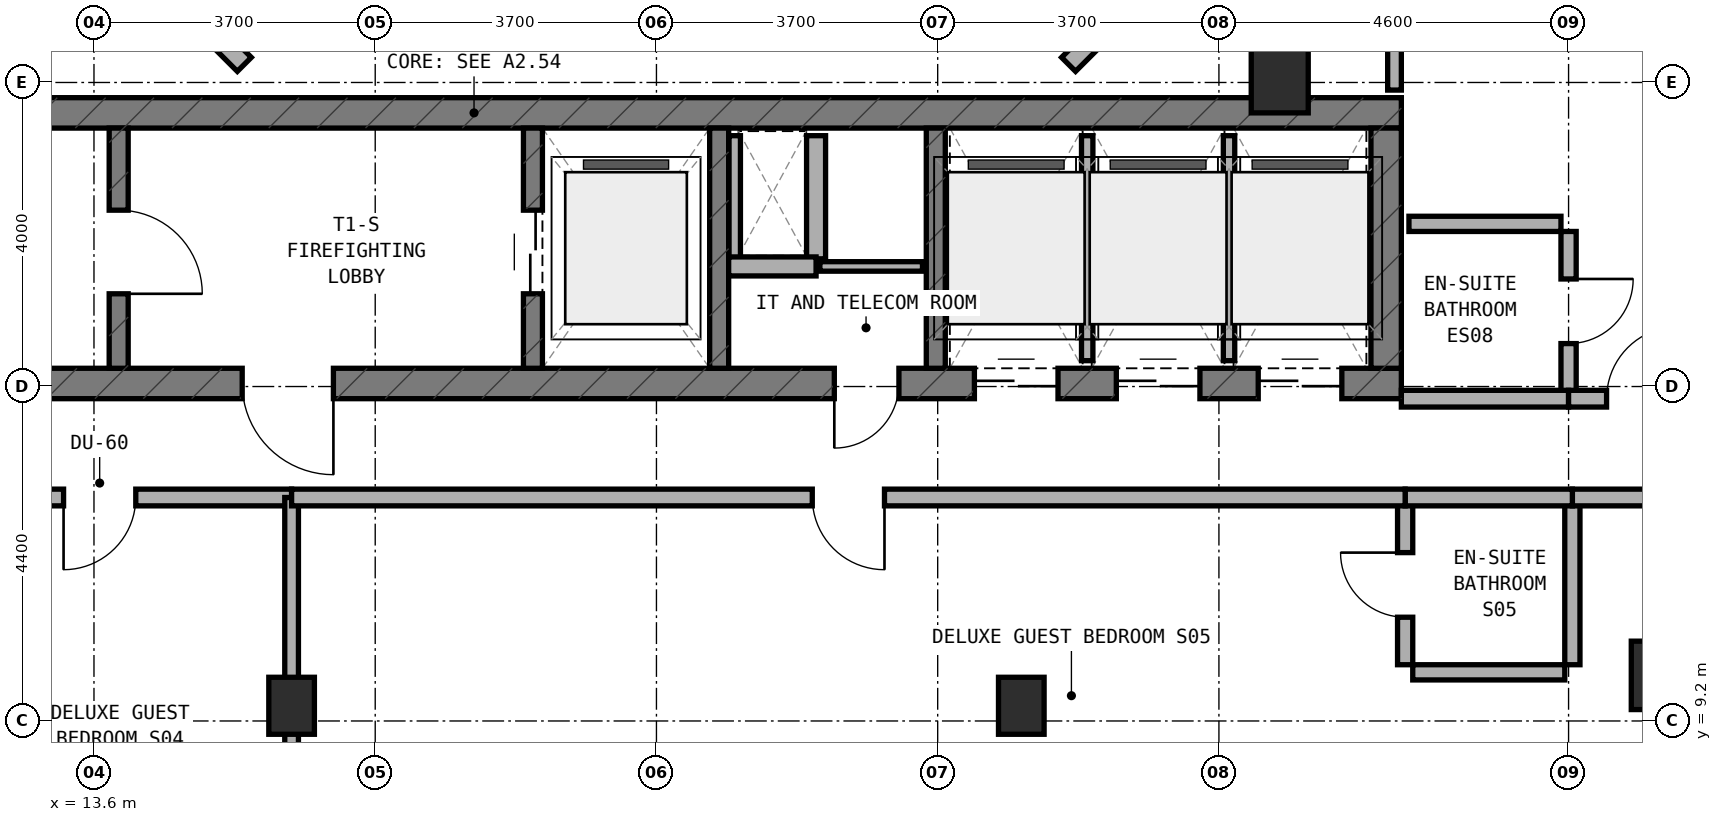
"""IFC4 building model, lengths in metres.
Left out: names, types, materials, properties, quantities, classifications, styles, units other than length and angle.
Written with IfcOpenShell. Run it as: python <this file> out.ifc"""

import sys

from ifc_helpers import new_model, si_unit, direction, frame, frame_2d, origin, origin_2d, place, context, subcontext, project, spatial, rectangle, extrude, element, fill, save


model = new_model("IFC4")
c1 = context("Model", 3, precision=1e-05, world=origin(), true_north=direction((0.0, 1.0)))
c2 = subcontext(c1, "Body", "Model", "MODEL_VIEW")
j1 = project(units=[si_unit("LENGTHUNIT", "METRE"), si_unit("PLANEANGLEUNIT", "RADIAN")], contexts=[c1])
p1 = place(None, origin())
s1 = spatial("IfcSite", under=j1, at=p1, CompositionType="ELEMENT")
p2 = place(p1, origin())
s2 = spatial("IfcBuilding", under=s1, at=p2, CompositionType="ELEMENT")
p3 = place(p2, frame((0.0, 0.0, 250.4)))
s3 = spatial("IfcBuildingStorey", under=s2, at=p3, CompositionType="ELEMENT", Elevation=250.4)
p4 = place(p3, frame((6.4, 13.64, 0.0), z_axis=(0.0, 0.0, 1.0), x_axis=(1.0, 0.0, 0.0)))
e1 = element("IfcWall", 1, at=p4, inside=s3, PredefinedType="SHEAR", context=c2, shape_type="SweptSolid", body=[
    extrude(rectangle(XDim=24.4, YDim=0.4, at=frame_2d((12.2, 0.0))), origin(), (0.0, 0.0, 1.0), 3.6),
])
p5 = place(p4, frame((9.15, 0.0, 0.0)))
e2 = element("IfcOpeningElement", 2, at=p5, cuts=e1, PredefinedType="OPENING", context=c2, shape_type="SweptSolid", body=[
    extrude(rectangle(XDim=1.2, YDim=2.15, at=frame_2d((0.6, 1.075))), frame((0.0, 0.21, 0.0), z_axis=(0.0, -1.0, 0.0), x_axis=(1.0, 0.0, 0.0)), (0.0, 0.0, 1.0), 0.42),
])
p6 = place(p4, frame((16.94, 0.0, 0.0)))
e3 = element("IfcOpeningElement", 3, at=p6, cuts=e1, PredefinedType="OPENING", context=c2, shape_type="SweptSolid", body=[
    extrude(rectangle(XDim=0.85, YDim=2.1, at=frame_2d((0.425, 1.05))), frame((0.0, 0.21, 0.0), z_axis=(0.0, -1.0, 0.0), x_axis=(1.0, 0.0, 0.0)), (0.0, 0.0, 1.0), 0.42),
])
p7 = place(p4, frame((18.783, 0.0, 0.0)))
e4 = element("IfcOpeningElement", 4, at=p7, cuts=e1, PredefinedType="OPENING", context=c2, shape_type="SweptSolid", body=[
    extrude(rectangle(XDim=1.1, YDim=2.15, at=frame_2d((0.55, 1.075))), frame((0.0, 0.21, 0.0), z_axis=(0.0, -1.0, 0.0), x_axis=(1.0, 0.0, 0.0)), (0.0, 0.0, 1.0), 0.42),
])
p8 = place(p4, frame((20.65, 0.0, 0.0)))
e5 = element("IfcOpeningElement", 5, at=p8, cuts=e1, PredefinedType="OPENING", context=c2, shape_type="SweptSolid", body=[
    extrude(rectangle(XDim=1.1, YDim=2.15, at=frame_2d((0.55, 1.075))), frame((0.0, 0.21, 0.0), z_axis=(0.0, -1.0, 0.0), x_axis=(1.0, 0.0, 0.0)), (0.0, 0.0, 1.0), 0.42),
])
p9 = place(p4, frame((22.517, 0.0, 0.0)))
e6 = element("IfcOpeningElement", 6, at=p9, cuts=e1, PredefinedType="OPENING", context=c2, shape_type="SweptSolid", body=[
    extrude(rectangle(XDim=1.1, YDim=2.15, at=frame_2d((0.55, 1.075))), frame((0.0, 0.21, 0.0), z_axis=(0.0, -1.0, 0.0), x_axis=(1.0, 0.0, 0.0)), (0.0, 0.0, 1.0), 0.42),
])
p10 = place(p3, frame((6.4, 17.2, 0.0), z_axis=(0.0, 0.0, 1.0), x_axis=(1.0, 0.0, 0.0)))
e7 = element("IfcWall", 7, at=p10, inside=s3, PredefinedType="SHEAR", context=c2, shape_type="SweptSolid", body=[
    extrude(rectangle(XDim=24.4, YDim=0.4, at=frame_2d((12.2, 0.0))), origin(), (0.0, 0.0, 1.0), 3.6),
])
p11 = place(p3, frame((30.6, 13.84, 0.0), z_axis=(0.0, 0.0, 1.0), x_axis=(0.0, 1.0, 0.0)))
e8 = element("IfcWall", 8, at=p11, inside=s3, PredefinedType="SHEAR", context=c2, shape_type="SweptSolid", body=[
    extrude(rectangle(XDim=3.16, YDim=0.4, at=frame_2d((1.58, 0.0))), origin(), (0.0, 0.0, 1.0), 3.6),
])
p12 = place(p3, frame((13.925, 13.84, 0.0), z_axis=(0.0, 0.0, 1.0), x_axis=(0.0, 1.0, 0.0)))
e9 = element("IfcWall", 9, at=p12, inside=s3, PredefinedType="STANDARD", context=c2, shape_type="SweptSolid", body=[
    extrude(rectangle(XDim=3.16, YDim=0.25, at=frame_2d((1.58, 0.0))), origin(), (0.0, 0.0, 1.0), 3.32),
])
p13 = place(p12, frame((0.98, 0.0, 0.0)))
e10 = element("IfcOpeningElement", 10, at=p13, cuts=e9, PredefinedType="OPENING", context=c2, shape_type="SweptSolid", body=[
    extrude(rectangle(XDim=1.1, YDim=2.15, at=frame_2d((0.55, 1.075))), frame((0.0, 0.135, 0.0), z_axis=(0.0, -1.0, 0.0), x_axis=(1.0, 0.0, 0.0)), (0.0, 0.0, 1.0), 0.27),
])
p14 = place(p3, frame((19.375, 13.84, 0.0), z_axis=(0.0, 0.0, 1.0), x_axis=(0.0, 1.0, 0.0)))
e11 = element("IfcWall", 11, at=p14, inside=s3, PredefinedType="STANDARD", context=c2, shape_type="SweptSolid", body=[
    extrude(rectangle(XDim=3.16, YDim=0.25, at=frame_2d((1.58, 0.0))), origin(), (0.0, 0.0, 1.0), 3.32),
])
p15 = place(p14, frame((0.98, 0.0, 0.0)))
e12 = element("IfcOpeningElement", 12, at=p15, cuts=e11, PredefinedType="OPENING", context=c2, shape_type="SweptSolid", body=[
    extrude(rectangle(XDim=1.1, YDim=2.15, at=frame_2d((0.55, 1.075))), frame((0.0, 0.135, 0.0), z_axis=(0.0, -1.0, 0.0), x_axis=(1.0, 0.0, 0.0)), (0.0, 0.0, 1.0), 0.27),
])
for number, where, z_axis, x_axis in (
    (13, (21.825, 13.84, 0.0), (0.0, 0.0, 1.0), (0.0, 1.0, 0.0)),
    (14, (24.675, 13.84, 0.0), (0.0, 0.0, 1.0), (0.0, 1.0, 0.0)),
):
    element("IfcWall", number, at=place(p3, frame(where, z_axis=z_axis, x_axis=x_axis)), inside=s3, PredefinedType="STANDARD", context=c2, shape_type="SweptSolid", body=[
        extrude(rectangle(XDim=3.16, YDim=0.25, at=frame_2d((1.58, 0.0))), origin(), (0.0, 0.0, 1.0), 3.32),
    ])
for number, where, z_axis, x_axis in (
    (15, (16.2, 9.4, 0.0), (0.0, 0.0, 1.0), (1.0, 0.0, 0.0)),
    (16, (25.8, 9.4, 0.0), (0.0, 0.0, 1.0), (1.0, 0.0, 0.0)),
):
    element("IfcColumn", number, at=place(p3, frame(where, z_axis=z_axis, x_axis=x_axis)), inside=s3, PredefinedType="COLUMN", context=c2, shape_type="SweptSolid", body=[
        extrude(rectangle(XDim=0.6, YDim=0.75, at=origin_2d()), origin(), (0.0, 0.0, 1.0), 3.6),
    ])
for number, where, z_axis, x_axis in (
    (17, (34.2, 9.8, 0.0), (0.0, 0.0, 1.0), (1.0, 0.0, 0.0)),
    (18, (29.2, 17.65, 0.0), (0.0, 0.0, 1.0), (1.0, 0.0, 0.0)),
):
    element("IfcColumn", number, at=place(p3, frame(where, z_axis=z_axis, x_axis=x_axis)), inside=s3, PredefinedType="COLUMN", context=c2, shape_type="SweptSolid", body=[
        extrude(rectangle(XDim=0.75, YDim=0.9, at=origin_2d()), origin(), (0.0, 0.0, 1.0), 3.6),
    ])
for number, where, z_axis, x_axis in (
    (19, (26.422, 17.838, 0.0), (0.0, 0.0, 1.0), (0.707, 0.707, 0.0)),
    (20, (13.944, 19.472, 0.0), (0.0, 0.0, 1.0), (0.707, -0.707, 0.0)),
):
    element("IfcWall", number, at=place(p3, frame(where, z_axis=z_axis, x_axis=x_axis)), inside=s3, PredefinedType="STANDARD", context=c2, shape_type="SweptSolid", body=[
        extrude(rectangle(XDim=2.311, YDim=0.26, at=frame_2d((1.155, 0.0))), origin(), (0.0, 0.0, 1.0), 3.32),
    ])
p16 = place(p3, frame((22.03, 15.28, 0.0), z_axis=(0.0, 0.0, 1.0), x_axis=(0.0, 1.0, 0.0)))
e21 = element("IfcWall", 21, at=p16, inside=s3, PredefinedType="PARTITIONING", context=c2, shape_type="SweptSolid", body=[
    extrude(rectangle(XDim=1.62, YDim=0.15, at=frame_2d((0.81, 0.0))), origin(), (0.0, 0.0, 1.0), 3.32),
])
p17 = place(p3, frame((23.1, 15.28, 0.0), z_axis=(0.0, 0.0, 1.0), x_axis=(0.0, 1.0, 0.0)))
e22 = element("IfcWall", 22, at=p17, inside=s3, PredefinedType="SOLIDWALL", context=c2, shape_type="SweptSolid", body=[
    extrude(rectangle(XDim=1.62, YDim=0.25, at=frame_2d((0.81, 0.0))), origin(), (0.0, 0.0, 1.0), 3.32),
])
p18 = place(p3, frame((21.95, 15.18, 0.0), z_axis=(0.0, 0.0, 1.0), x_axis=(1.0, 0.0, 0.0)))
e23 = element("IfcWall", 23, at=p18, inside=s3, PredefinedType="SOLIDWALL", context=c2, shape_type="SweptSolid", body=[
    extrude(rectangle(XDim=1.15, YDim=0.25, at=frame_2d((0.575, 0.0))), origin(), (0.0, 0.0, 1.0), 3.32),
])
p19 = place(p3, frame((23.15, 15.18, 0.0), z_axis=(0.0, 0.0, 1.0), x_axis=(1.0, 0.0, 0.0)))
e24 = element("IfcWall", 24, at=p19, inside=s3, PredefinedType="PARTITIONING", context=c2, shape_type="SweptSolid", body=[
    extrude(rectangle(XDim=1.35, YDim=0.125, at=frame_2d((0.675, 0.0))), origin(), (0.0, 0.0, 1.0), 3.32),
])
p20 = place(p3, frame((26.667, 13.94, 0.0), z_axis=(0.0, 0.0, 1.0), x_axis=(0.0, 1.0, 0.0)))
e25 = element("IfcWall", 25, at=p20, inside=s3, PredefinedType="PARTITIONING", context=c2, shape_type="SweptSolid", body=[
    extrude(rectangle(XDim=2.96, YDim=0.15, at=frame_2d((1.48, 0.0))), origin(), (0.0, 0.0, 1.0), 3.32),
])
p21 = place(p3, frame((28.533, 13.94, 0.0), z_axis=(0.0, 0.0, 1.0), x_axis=(0.0, 1.0, 0.0)))
e26 = element("IfcWall", 26, at=p21, inside=s3, PredefinedType="PARTITIONING", context=c2, shape_type="SweptSolid", body=[
    extrude(rectangle(XDim=2.96, YDim=0.15, at=frame_2d((1.48, 0.0))), origin(), (0.0, 0.0, 1.0), 2.745),
])
p22 = place(p3, frame((11.15, 12.14, 0.0), z_axis=(0.0, 0.0, 1.0), x_axis=(1.0, 0.0, 0.0)))
e27 = element("IfcWall", 27, at=p22, inside=s3, PredefinedType="SOLIDWALL", context=c2, shape_type="SweptSolid", body=[
    extrude(rectangle(XDim=5.05, YDim=0.22, at=frame_2d((2.525, 0.0))), origin(), (0.0, 0.0, 1.0), 2.745),
])
p23 = place(p22, frame((2.05, 0.0, 0.0)))
e28 = element("IfcOpeningElement", 28, at=p23, cuts=e27, PredefinedType="OPENING", context=c2, shape_type="SweptSolid", body=[
    extrude(rectangle(XDim=0.95, YDim=2.1, at=frame_2d((0.475, 1.05))), frame((0.0, 0.12, 0.0), z_axis=(0.0, -1.0, 0.0), x_axis=(1.0, 0.0, 0.0)), (0.0, 0.0, 1.0), 0.24),
])
p24 = place(p3, frame((16.2, 6.86, 0.0), z_axis=(0.0, 0.0, 1.0), x_axis=(0.0, 1.0, 0.0)))
e29 = element("IfcWall", 29, at=p24, inside=s3, PredefinedType="SOLIDWALL", context=c2, shape_type="SweptSolid", body=[
    extrude(rectangle(XDim=5.28, YDim=0.18, at=frame_2d((2.64, 0.0))), origin(), (0.0, 0.0, 1.0), 2.745),
])
p25 = place(p3, frame((30.85, 9.94, 0.0), z_axis=(0.0, 0.0, 1.0), x_axis=(0.0, 1.0, 0.0)))
e30 = element("IfcWall", 30, at=p25, inside=s3, PredefinedType="PLUMBINGWALL", context=c2, shape_type="SweptSolid", body=[
    extrude(rectangle(XDim=2.1, YDim=0.2, at=frame_2d((1.05, 0.0))), origin(), (0.0, 0.0, 1.0), 3.055),
])
p26 = place(p25, frame((0.625, 0.0, 0.0)))
e31 = element("IfcOpeningElement", 31, at=p26, cuts=e30, PredefinedType="OPENING", context=c2, shape_type="SweptSolid", body=[
    extrude(rectangle(XDim=0.85, YDim=2.1, at=frame_2d((0.425, 1.05))), frame((0.0, 0.11, 0.0), z_axis=(0.0, -1.0, 0.0), x_axis=(1.0, 0.0, 0.0)), (0.0, 0.0, 1.0), 0.22),
])
p27 = place(p3, frame((30.95, 9.84, 0.0), z_axis=(0.0, 0.0, 1.0), x_axis=(1.0, 0.0, 0.0)))
e32 = element("IfcWall", 32, at=p27, inside=s3, PredefinedType="PLUMBINGWALL", context=c2, shape_type="SweptSolid", body=[
    extrude(rectangle(XDim=2.0, YDim=0.2, at=frame_2d((1.0, 0.0))), origin(), (0.0, 0.0, 1.0), 3.015),
])
p28 = place(p3, frame((33.05, 9.94, 0.0), z_axis=(0.0, 0.0, 1.0), x_axis=(0.0, 1.0, 0.0)))
e33 = element("IfcWall", 33, at=p28, inside=s3, PredefinedType="PLUMBINGWALL", context=c2, shape_type="SweptSolid", body=[
    extrude(rectangle(XDim=2.1, YDim=0.2, at=frame_2d((1.05, 0.0))), origin(), (0.0, 0.0, 1.0), 3.055),
])
p29 = place(p3, frame((33.05, 12.14, 0.0), z_axis=(0.0, 0.0, 1.0), x_axis=(1.0, 0.0, 0.0)))
e34 = element("IfcWall", 34, at=p29, inside=s3, PredefinedType="SOLIDWALL", context=c2, shape_type="SweptSolid", body=[
    extrude(rectangle(XDim=5.59, YDim=0.22, at=frame_2d((2.795, 0.0))), origin(), (0.0, 0.0, 1.0), 2.745),
])
p30 = place(p3, frame((30.85, 12.14, 0.0), z_axis=(0.0, 0.0, 1.0), x_axis=(1.0, 0.0, 0.0)))
e35 = element("IfcWall", 35, at=p30, inside=s3, PredefinedType="SOLIDWALL", context=c2, shape_type="SweptSolid", body=[
    extrude(rectangle(XDim=2.2, YDim=0.22, at=frame_2d((1.1, 0.0))), origin(), (0.0, 0.0, 1.0), 3.32),
])
p31 = place(p3, frame((16.2, 12.14, 0.0), z_axis=(0.0, 0.0, 1.0), x_axis=(1.0, 0.0, 0.0)))
e36 = element("IfcWall", 36, at=p31, inside=s3, PredefinedType="SOLIDWALL", context=c2, shape_type="SweptSolid", body=[
    extrude(rectangle(XDim=14.65, YDim=0.22, at=frame_2d((7.325, 0.0))), origin(), (0.0, 0.0, 1.0), 2.745),
])
p32 = place(p31, frame((6.85, 0.0, 0.0)))
e37 = element("IfcOpeningElement", 37, at=p32, cuts=e36, PredefinedType="OPENING", context=c2, shape_type="SweptSolid", body=[
    extrude(rectangle(XDim=0.95, YDim=2.1, at=frame_2d((0.475, 1.05))), frame((0.0, 0.12, 0.0), z_axis=(0.0, -1.0, 0.0), x_axis=(1.0, 0.0, 0.0)), (0.0, 0.0, 1.0), 0.24),
])
p33 = place(p3, frame((30.71, 17.5, 0.0), z_axis=(0.0, 0.0, 1.0), x_axis=(0.0, 1.0, 0.0)))
e38 = element("IfcWall", 38, at=p33, inside=s3, PredefinedType="SOLIDWALL", context=c2, shape_type="SweptSolid", body=[
    extrude(rectangle(XDim=15.0, YDim=0.18, at=frame_2d((7.5, 0.0))), origin(), (0.0, 0.0, 1.0), 2.745),
])
p34 = place(p3, frame((33.0, 13.54, 0.0), z_axis=(0.0, 0.0, 1.0), x_axis=(0.0, 1.0, 0.0)))
e39 = element("IfcWall", 39, at=p34, inside=s3, PredefinedType="PLUMBINGWALL", context=c2, shape_type="SweptSolid", body=[
    extrude(rectangle(XDim=2.1, YDim=0.2, at=frame_2d((1.05, 0.0))), origin(), (0.0, 0.0, 1.0), 3.32),
])
p35 = place(p34, frame((0.625, 0.0, 0.0)))
e40 = element("IfcOpeningElement", 40, at=p35, cuts=e39, PredefinedType="OPENING", context=c2, shape_type="SweptSolid", body=[
    extrude(rectangle(XDim=0.85, YDim=2.1, at=frame_2d((0.425, 1.05))), frame((0.0, 0.11, 0.0), z_axis=(0.0, -1.0, 0.0), x_axis=(1.0, 0.0, 0.0)), (0.0, 0.0, 1.0), 0.22),
])
p36 = place(p3, frame((30.9, 15.74, 0.0), z_axis=(0.0, 0.0, 1.0), x_axis=(1.0, 0.0, 0.0)))
e41 = element("IfcWall", 41, at=p36, inside=s3, PredefinedType="PLUMBINGWALL", context=c2, shape_type="SweptSolid", body=[
    extrude(rectangle(XDim=2.0, YDim=0.2, at=frame_2d((1.0, 0.0))), origin(), (0.0, 0.0, 1.0), 3.32),
])
p37 = place(p3, frame((30.8, 13.44, 0.0), z_axis=(0.0, 0.0, 1.0), x_axis=(1.0, 0.0, 0.0)))
e42 = element("IfcWall", 42, at=p37, inside=s3, PredefinedType="SOLIDWALL", context=c2, shape_type="SweptSolid", body=[
    extrude(rectangle(XDim=2.2, YDim=0.22, at=frame_2d((1.1, 0.0))), origin(), (0.0, 0.0, 1.0), 3.32),
])
p38 = place(p3, frame((33.0, 13.44, 0.0), z_axis=(0.0, 0.0, 1.0), x_axis=(1.0, 0.0, 0.0)))
e43 = element("IfcWall", 43, at=p38, inside=s3, PredefinedType="SOLIDWALL", context=c2, shape_type="SweptSolid", body=[
    extrude(rectangle(XDim=5.8, YDim=0.22, at=frame_2d((2.9, 0.0))), origin(), (0.0, 0.0, 1.0), 2.745),
])
p39 = place(p38, frame((0.5, 0.0, 0.0)))
e44 = element("IfcOpeningElement", 44, at=p39, cuts=e43, PredefinedType="OPENING", context=c2, shape_type="SweptSolid", body=[
    extrude(rectangle(XDim=0.95, YDim=2.1, at=frame_2d((0.475, 1.05))), frame((0.0, 0.12, 0.0), z_axis=(0.0, -1.0, 0.0), x_axis=(1.0, 0.0, 0.0)), (0.0, 0.0, 1.0), 0.24),
])
p40 = place(p13, frame((1.1, 0.0, 0.0), z_axis=(0.0, 0.0, 1.0), x_axis=(-1.0, 0.0, 0.0)))
e45 = element("IfcDoor", 45, at=p40, inside=s3, OperationType="SINGLE_SWING_RIGHT", PredefinedType="DOOR", context=c2, shape_type="SweptSolid", body=[
    extrude(rectangle(XDim=1.1, YDim=2.15, at=frame_2d((0.55, 1.075))), frame((0.0, 0.025, 0.0), z_axis=(0.0, -1.0, 0.0), x_axis=(1.0, 0.0, 0.0)), (0.0, 0.0, 1.0), 0.05),
])
fill(e10, e45)
p41 = place(p5, frame((1.2, 0.0, 0.0), z_axis=(0.0, 0.0, 1.0), x_axis=(-1.0, 0.0, 0.0)))
e46 = element("IfcDoor", 46, at=p41, inside=s3, OperationType="SINGLE_SWING_LEFT", PredefinedType="DOOR", context=c2, shape_type="SweptSolid", body=[
    extrude(rectangle(XDim=1.2, YDim=2.15, at=frame_2d((0.6, 1.075))), frame((0.0, 0.025, 0.0), z_axis=(0.0, -1.0, 0.0), x_axis=(1.0, 0.0, 0.0)), (0.0, 0.0, 1.0), 0.05),
])
fill(e2, e46)
p42 = place(p15, origin())
e47 = element("IfcDoor", 47, at=p42, inside=s3, OperationType="DOUBLE_DOOR_SLIDING", PredefinedType="DOOR", context=c2, shape_type="SweptSolid", body=[
    extrude(rectangle(XDim=1.1, YDim=2.15, at=frame_2d((0.55, 1.075))), frame((0.0, 0.025, 0.0), z_axis=(0.0, -1.0, 0.0), x_axis=(1.0, 0.0, 0.0)), (0.0, 0.0, 1.0), 0.05),
])
fill(e12, e47)
p43 = place(p6, frame((0.85, 0.0, 0.0), z_axis=(0.0, 0.0, 1.0), x_axis=(-1.0, 0.0, 0.0)))
e48 = element("IfcDoor", 48, at=p43, inside=s3, OperationType="SINGLE_SWING_RIGHT", PredefinedType="DOOR", context=c2, shape_type="SweptSolid", body=[
    extrude(rectangle(XDim=0.85, YDim=2.1, at=frame_2d((0.425, 1.05))), frame((0.0, 0.025, 0.0), z_axis=(0.0, -1.0, 0.0), x_axis=(1.0, 0.0, 0.0)), (0.0, 0.0, 1.0), 0.05),
])
fill(e3, e48)
p44 = place(p7, frame((1.1, 0.0, 0.0), z_axis=(0.0, 0.0, 1.0), x_axis=(-1.0, 0.0, 0.0)))
e49 = element("IfcDoor", 49, at=p44, inside=s3, OperationType="DOUBLE_DOOR_SLIDING", PredefinedType="DOOR", context=c2, shape_type="SweptSolid", body=[
    extrude(rectangle(XDim=1.1, YDim=2.15, at=frame_2d((0.55, 1.075))), frame((0.0, 0.025, 0.0), z_axis=(0.0, -1.0, 0.0), x_axis=(1.0, 0.0, 0.0)), (0.0, 0.0, 1.0), 0.05),
])
fill(e4, e49)
p45 = place(p8, frame((1.1, 0.0, 0.0), z_axis=(0.0, 0.0, 1.0), x_axis=(-1.0, 0.0, 0.0)))
e50 = element("IfcDoor", 50, at=p45, inside=s3, OperationType="DOUBLE_DOOR_SLIDING", PredefinedType="DOOR", context=c2, shape_type="SweptSolid", body=[
    extrude(rectangle(XDim=1.1, YDim=2.15, at=frame_2d((0.55, 1.075))), frame((0.0, 0.025, 0.0), z_axis=(0.0, -1.0, 0.0), x_axis=(1.0, 0.0, 0.0)), (0.0, 0.0, 1.0), 0.05),
])
fill(e5, e50)
p46 = place(p9, frame((1.1, 0.0, 0.0), z_axis=(0.0, 0.0, 1.0), x_axis=(-1.0, 0.0, 0.0)))
e51 = element("IfcDoor", 51, at=p46, inside=s3, OperationType="DOUBLE_DOOR_SLIDING", PredefinedType="DOOR", context=c2, shape_type="SweptSolid", body=[
    extrude(rectangle(XDim=1.1, YDim=2.15, at=frame_2d((0.55, 1.075))), frame((0.0, 0.025, 0.0), z_axis=(0.0, -1.0, 0.0), x_axis=(1.0, 0.0, 0.0)), (0.0, 0.0, 1.0), 0.05),
])
fill(e6, e51)
p47 = place(p23, frame((0.95, 0.0, 0.0), z_axis=(0.0, 0.0, 1.0), x_axis=(-1.0, 0.0, 0.0)))
e52 = element("IfcDoor", 52, at=p47, inside=s3, OperationType="SINGLE_SWING_RIGHT", PredefinedType="DOOR", context=c2, shape_type="SweptSolid", body=[
    extrude(rectangle(XDim=0.95, YDim=2.1, at=frame_2d((0.475, 1.05))), frame((0.0, 0.025, 0.0), z_axis=(0.0, -1.0, 0.0), x_axis=(1.0, 0.0, 0.0)), (0.0, 0.0, 1.0), 0.05),
])
fill(e28, e52)
p48 = place(p26, origin())
e53 = element("IfcDoor", 53, at=p48, inside=s3, OperationType="SINGLE_SWING_RIGHT", PredefinedType="DOOR", context=c2, shape_type="SweptSolid", body=[
    extrude(rectangle(XDim=0.85, YDim=2.1, at=frame_2d((0.425, 1.05))), frame((0.0, 0.025, 0.0), z_axis=(0.0, -1.0, 0.0), x_axis=(1.0, 0.0, 0.0)), (0.0, 0.0, 1.0), 0.05),
])
fill(e31, e53)
p49 = place(p32, frame((0.95, 0.0, 0.0), z_axis=(0.0, 0.0, 1.0), x_axis=(-1.0, 0.0, 0.0)))
e54 = element("IfcDoor", 54, at=p49, inside=s3, OperationType="SINGLE_SWING_LEFT", PredefinedType="DOOR", context=c2, shape_type="SweptSolid", body=[
    extrude(rectangle(XDim=0.95, YDim=2.1, at=frame_2d((0.475, 1.05))), frame((0.0, 0.025, 0.0), z_axis=(0.0, -1.0, 0.0), x_axis=(1.0, 0.0, 0.0)), (0.0, 0.0, 1.0), 0.05),
])
fill(e37, e54)
p50 = place(p35, frame((0.85, 0.0, 0.0), z_axis=(0.0, 0.0, 1.0), x_axis=(-1.0, 0.0, 0.0)))
e55 = element("IfcDoor", 55, at=p50, inside=s3, OperationType="SINGLE_SWING_LEFT", PredefinedType="DOOR", context=c2, shape_type="SweptSolid", body=[
    extrude(rectangle(XDim=0.85, YDim=2.1, at=frame_2d((0.425, 1.05))), frame((0.0, 0.025, 0.0), z_axis=(0.0, -1.0, 0.0), x_axis=(1.0, 0.0, 0.0)), (0.0, 0.0, 1.0), 0.05),
])
fill(e40, e55)
p51 = place(p39, origin())
e56 = element("IfcDoor", 56, at=p51, inside=s3, OperationType="SINGLE_SWING_RIGHT", PredefinedType="DOOR", context=c2, shape_type="SweptSolid", body=[
    extrude(rectangle(XDim=0.95, YDim=2.1, at=frame_2d((0.475, 1.05))), frame((0.0, 0.025, 0.0), z_axis=(0.0, -1.0, 0.0), x_axis=(1.0, 0.0, 0.0)), (0.0, 0.0, 1.0), 0.05),
])
fill(e44, e56)
save(model, sys.argv[1])
